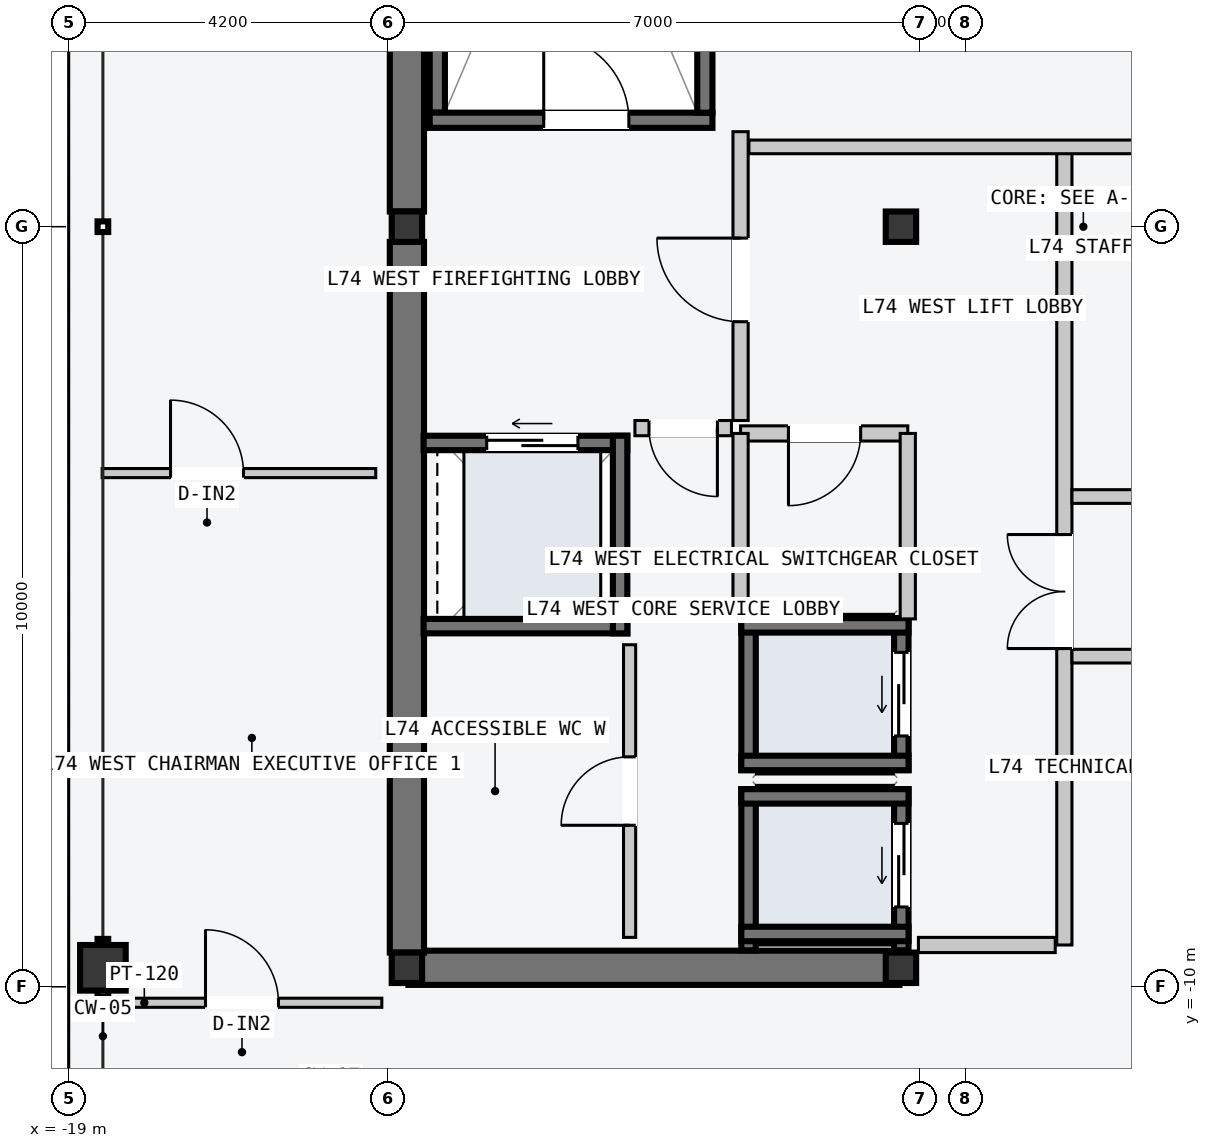
"""IFC4 building model, lengths in metres.
Left out: names, types, materials, properties, quantities, classifications, styles, units other than length and angle.
Written with IfcOpenShell. Run it as: python <this file> out.ifc"""

import sys

from ifc_helpers import new_model, si_unit, direction, frame, frame_2d, origin, origin_2d, place, context, subcontext, project, spatial, rectangle, hollow_rectangle, i_section, extrude, element, fill, save


model = new_model("IFC4")
c1 = context("Model", 3, precision=1e-05, world=origin(), true_north=direction((0.0, 1.0)))
c2 = subcontext(c1, "Body", "Model", "MODEL_VIEW")
j1 = project(units=[si_unit("LENGTHUNIT", "METRE"), si_unit("PLANEANGLEUNIT", "RADIAN")], contexts=[c1])
p1 = place(None, origin())
s1 = spatial("IfcSite", under=j1, at=p1, CompositionType="ELEMENT")
p2 = place(p1, origin())
s2 = spatial("IfcBuilding", under=s1, at=p2, CompositionType="ELEMENT")
p3 = place(p2, frame((0.0, 0.0, 280.8)))
s3 = spatial("IfcBuildingStorey", under=s2, at=p3, CompositionType="ELEMENT", Elevation=280.8)
p4 = place(p3, frame((-14.53, -9.75, -0.2), z_axis=(0.0, 0.0, 1.0), x_axis=(1.0, 0.0, 0.0)))
e1 = element("IfcWall", 1, at=p4, inside=s3, PredefinedType="SHEAR", context=c2, shape_type="SweptSolid", body=[
    extrude(rectangle(XDim=6.46, YDim=0.45, at=frame_2d((3.23, 0.0))), origin(), (0.0, 0.0, 1.0), 3.6),
])
for number, where, z_axis, x_axis in (
    (2, (-14.55, -9.55, -0.2), (0.0, 0.0, 1.0), (0.0, 1.0, 0.0)),
    (3, (-14.55, 0.2, -0.2), (0.0, 0.0, 1.0), (0.0, 1.0, 0.0)),
):
    element("IfcWall", number, at=place(p3, frame(where, z_axis=z_axis, x_axis=x_axis)), inside=s3, PredefinedType="SHEAR", context=c2, shape_type="SweptSolid", body=[
        extrude(rectangle(XDim=9.35, YDim=0.45, at=frame_2d((4.675, 0.0))), origin(), (0.0, 0.0, 1.0), 3.6),
    ])
p5 = place(p3, frame((-14.15, 1.5, -0.2), z_axis=(0.0, 0.0, 1.0), x_axis=(0.0, 1.0, 0.0)))
e4 = element("IfcWall", 4, at=p5, inside=s3, PredefinedType="SOLIDWALL", context=c2, shape_type="SweptSolid", body=[
    extrude(rectangle(XDim=7.8, YDim=0.2, at=frame_2d((3.9, 0.0))), origin(), (0.0, 0.0, 1.0), 3.6),
])
p6 = place(p3, frame((-14.25, 1.4, -0.2), z_axis=(0.0, 0.0, 1.0), x_axis=(1.0, 0.0, 0.0)))
e5 = element("IfcWall", 5, at=p6, inside=s3, PredefinedType="SOLIDWALL", context=c2, shape_type="SweptSolid", body=[
    extrude(rectangle(XDim=3.72, YDim=0.2, at=frame_2d((1.86, 0.0))), origin(), (0.0, 0.0, 1.0), 3.6),
])
p7 = place(p6, frame((1.5, 0.0, 0.2)))
e6 = element("IfcOpeningElement", 6, at=p7, cuts=e5, PredefinedType="OPENING", context=c2, shape_type="SweptSolid", body=[
    extrude(rectangle(XDim=1.12, YDim=2.18, at=frame_2d((0.56, 1.09))), frame((0.0, 0.11, 0.0), z_axis=(0.0, -1.0, 0.0), x_axis=(1.0, 0.0, 0.0)), (0.0, 0.0, 1.0), 0.22),
])
p8 = place(p3, frame((-10.63, 1.5, -0.2), z_axis=(0.0, 0.0, 1.0), x_axis=(0.0, 1.0, 0.0)))
e7 = element("IfcWall", 7, at=p8, inside=s3, PredefinedType="SOLIDWALL", context=c2, shape_type="SweptSolid", body=[
    extrude(rectangle(XDim=7.8, YDim=0.2, at=frame_2d((3.9, 0.0))), origin(), (0.0, 0.0, 1.0), 3.6),
])
for number, where, z_axis, x_axis in (
    (8, (-14.55, -9.75, 0.0), (0.0, 0.0, 1.0), (1.0, 0.0, 0.0)),
    (9, (-14.55, 0.0, 0.0), (0.0, 0.0, 1.0), (1.0, 0.0, 0.0)),
    (10, (-8.05, -9.75, 0.0), (0.0, 0.0, 1.0), (1.0, 0.0, 0.0)),
    (11, (-8.05, 0.0, 0.0), (0.0, 0.0, 1.0), (1.0, 0.0, 0.0)),
):
    element("IfcColumn", number, at=place(p3, frame(where, z_axis=z_axis, x_axis=x_axis)), inside=s3, PredefinedType="COLUMN", context=c2, shape_type="SweptSolid", body=[
        extrude(i_section(OverallWidth=0.4, OverallDepth=0.4, WebThickness=0.013, FlangeThickness=0.021, at=origin_2d()), origin(), (0.0, 0.0, 1.0), 3.6),
    ])
p9 = place(p3, frame((-18.55, -9.75, 0.0), z_axis=(0.0, 0.0, 1.0), x_axis=(0.0, 1.0, 0.0)))
e12 = element("IfcColumn", 12, at=p9, inside=s3, PredefinedType="COLUMN", context=c2, shape_type="SweptSolid", body=[
    extrude(hollow_rectangle(XDim=0.6, YDim=0.6, WallThickness=0.025, at=origin_2d()), origin(), (0.0, 0.0, 1.0), 3.6),
])
p10 = place(p3, frame((-8.045, -9.52, -0.2), z_axis=(0.0, 0.0, 1.0), x_axis=(0.0, 1.0, 0.0)))
e13 = element("IfcWall", 13, at=p10, inside=s3, PredefinedType="SOLIDWALL", context=c2, shape_type="SweptSolid", body=[
    extrude(rectangle(XDim=2.12, YDim=0.19, at=frame_2d((1.06, 0.0))), origin(), (0.0, 0.0, 1.0), 3.6),
])
p11 = place(p10, frame((0.57, 0.0, 0.2)))
e14 = element("IfcOpeningElement", 14, at=p11, cuts=e13, PredefinedType="OPENING", context=c2, shape_type="SweptSolid", body=[
    extrude(rectangle(XDim=1.1, YDim=2.2, at=frame_2d((0.55, 1.1))), frame((0.0, 0.105, 0.0), z_axis=(0.0, -1.0, 0.0), x_axis=(1.0, 0.0, 0.0)), (0.0, 0.0, 1.0), 0.21),
])
p12 = place(p3, frame((-10.055, -9.52, -0.2), z_axis=(0.0, 0.0, 1.0), x_axis=(0.0, 1.0, 0.0)))
e15 = element("IfcWall", 15, at=p12, inside=s3, PredefinedType="SOLIDWALL", context=c2, shape_type="SweptSolid", body=[
    extrude(rectangle(XDim=2.12, YDim=0.19, at=frame_2d((1.06, 0.0))), origin(), (0.0, 0.0, 1.0), 3.6),
])
for number, where, z_axis, x_axis in (
    (16, (-10.15, -7.495, -0.2), (0.0, 0.0, 1.0), (1.0, 0.0, 0.0)),
    (17, (-10.15, -9.305, -0.2), (0.0, 0.0, 1.0), (1.0, 0.0, 0.0)),
):
    element("IfcWall", number, at=place(p3, frame(where, z_axis=z_axis, x_axis=x_axis)), inside=s3, PredefinedType="SOLIDWALL", context=c2, shape_type="SweptSolid", body=[
        extrude(rectangle(XDim=2.2, YDim=0.19, at=frame_2d((1.1, 0.0))), origin(), (0.0, 0.0, 1.0), 3.6),
    ])
p13 = place(p3, frame((-8.045, -7.15, -0.2), z_axis=(0.0, 0.0, 1.0), x_axis=(0.0, 1.0, 0.0)))
e18 = element("IfcWall", 18, at=p13, inside=s3, PredefinedType="SOLIDWALL", context=c2, shape_type="SweptSolid", body=[
    extrude(rectangle(XDim=2.0, YDim=0.19, at=frame_2d((1.0, 0.0))), origin(), (0.0, 0.0, 1.0), 3.6),
])
p14 = place(p13, frame((0.45, 0.0, 0.2)))
e19 = element("IfcOpeningElement", 19, at=p14, cuts=e18, PredefinedType="OPENING", context=c2, shape_type="SweptSolid", body=[
    extrude(rectangle(XDim=1.1, YDim=2.2, at=frame_2d((0.55, 1.1))), frame((0.0, 0.105, 0.0), z_axis=(0.0, -1.0, 0.0), x_axis=(1.0, 0.0, 0.0)), (0.0, 0.0, 1.0), 0.21),
])
p15 = place(p3, frame((-10.055, -7.15, -0.2), z_axis=(0.0, 0.0, 1.0), x_axis=(0.0, 1.0, 0.0)))
e20 = element("IfcWall", 20, at=p15, inside=s3, PredefinedType="SOLIDWALL", context=c2, shape_type="SweptSolid", body=[
    extrude(rectangle(XDim=2.0, YDim=0.19, at=frame_2d((1.0, 0.0))), origin(), (0.0, 0.0, 1.0), 3.6),
])
for number, where, z_axis, x_axis in (
    (21, (-10.15, -5.245, -0.2), (0.0, 0.0, 1.0), (1.0, 0.0, 0.0)),
    (22, (-10.15, -7.055, -0.2), (0.0, 0.0, 1.0), (1.0, 0.0, 0.0)),
):
    element("IfcWall", number, at=place(p3, frame(where, z_axis=z_axis, x_axis=x_axis)), inside=s3, PredefinedType="SOLIDWALL", context=c2, shape_type="SweptSolid", body=[
        extrude(rectangle(XDim=2.2, YDim=0.19, at=frame_2d((1.1, 0.0))), origin(), (0.0, 0.0, 1.0), 3.6),
    ])
p16 = place(p3, frame((-14.33, -2.845, -0.2), z_axis=(0.0, 0.0, 1.0), x_axis=(1.0, 0.0, 0.0)))
e23 = element("IfcWall", 23, at=p16, inside=s3, PredefinedType="SOLIDWALL", context=c2, shape_type="SweptSolid", body=[
    extrude(rectangle(XDim=2.68, YDim=0.19, at=frame_2d((1.34, 0.0))), origin(), (0.0, 0.0, 1.0), 3.6),
])
p17 = place(p16, frame((0.83, 0.0, 0.2)))
e24 = element("IfcOpeningElement", 24, at=p17, cuts=e23, PredefinedType="OPENING", context=c2, shape_type="SweptSolid", body=[
    extrude(rectangle(XDim=1.2, YDim=2.2, at=frame_2d((0.6, 1.1))), frame((0.0, 0.105, 0.0), z_axis=(0.0, -1.0, 0.0), x_axis=(1.0, 0.0, 0.0)), (0.0, 0.0, 1.0), 0.21),
])
p18 = place(p3, frame((-14.33, -5.255, -0.2), z_axis=(0.0, 0.0, 1.0), x_axis=(1.0, 0.0, 0.0)))
e25 = element("IfcWall", 25, at=p18, inside=s3, PredefinedType="SOLIDWALL", context=c2, shape_type="SweptSolid", body=[
    extrude(rectangle(XDim=2.68, YDim=0.19, at=frame_2d((1.34, 0.0))), origin(), (0.0, 0.0, 1.0), 3.6),
])
p19 = place(p3, frame((-11.745, -5.35, -0.2), z_axis=(0.0, 0.0, 1.0), x_axis=(0.0, 1.0, 0.0)))
e26 = element("IfcWall", 26, at=p19, inside=s3, PredefinedType="SOLIDWALL", context=c2, shape_type="SweptSolid", body=[
    extrude(rectangle(XDim=2.6, YDim=0.19, at=frame_2d((1.3, 0.0))), origin(), (0.0, 0.0, 1.0), 3.6),
])
p20 = place(p3, frame((-5.9, -9.45, 0.0), z_axis=(0.0, 0.0, 1.0), x_axis=(0.0, 1.0, 0.0)))
e27 = element("IfcWall", 27, at=p20, inside=s3, PredefinedType="PARTITIONING", context=c2, shape_type="SweptSolid", body=[
    extrude(rectangle(XDim=10.5, YDim=0.2, at=frame_2d((5.25, 0.0))), origin(), (0.0, 0.0, 1.0), 3.4),
])
p21 = place(p20, frame((3.9, 0.0, 0.0)))
e28 = element("IfcOpeningElement", 28, at=p21, cuts=e27, PredefinedType="OPENING", context=c2, shape_type="SweptSolid", body=[
    extrude(rectangle(XDim=1.5, YDim=2.2, at=frame_2d((0.75, 1.1))), frame((0.0, 0.11, 0.0), z_axis=(0.0, -1.0, 0.0), x_axis=(1.0, 0.0, 0.0)), (0.0, 0.0, 1.0), 0.22),
])
p22 = place(p3, frame((-6.02, -9.45, 0.0), z_axis=(0.0, 0.0, 1.0), x_axis=(-1.0, 0.0, 0.0)))
e29 = element("IfcWall", 29, at=p22, inside=s3, PredefinedType="PARTITIONING", context=c2, shape_type="SweptSolid", body=[
    extrude(rectangle(XDim=1.8, YDim=0.2, at=frame_2d((0.9, 0.0))), origin(), (0.0, 0.0, 1.0), 3.4),
])
p23 = place(p3, frame((-10.16, -2.55, 0.0), z_axis=(0.0, 0.0, 1.0), x_axis=(0.0, 1.0, 0.0)))
e30 = element("IfcWall", 30, at=p23, inside=s3, PredefinedType="PARTITIONING", context=c2, shape_type="SweptSolid", body=[
    extrude(rectangle(XDim=3.8, YDim=0.2, at=frame_2d((1.9, 0.0))), origin(), (0.0, 0.0, 1.0), 3.4),
])
p24 = place(p23, frame((1.3, 0.0, 0.0)))
e31 = element("IfcOpeningElement", 31, at=p24, cuts=e30, PredefinedType="OPENING", context=c2, shape_type="SweptSolid", body=[
    extrude(rectangle(XDim=1.1, YDim=2.15, at=frame_2d((0.55, 1.075))), frame((0.0, 0.11, 0.0), z_axis=(0.0, -1.0, 0.0), x_axis=(1.0, 0.0, 0.0)), (0.0, 0.0, 1.0), 0.22),
])
p25 = place(p3, frame((-10.28, -2.65, 0.0), z_axis=(0.0, 0.0, 1.0), x_axis=(-1.0, 0.0, 0.0)))
e32 = element("IfcWall", 32, at=p25, inside=s3, PredefinedType="PARTITIONING", context=c2, shape_type="SweptSolid", body=[
    extrude(rectangle(XDim=1.27, YDim=0.2, at=frame_2d((0.635, 0.0))), origin(), (0.0, 0.0, 1.0), 3.4),
])
p26 = place(p25, frame((0.185, 0.0, 0.0)))
e33 = element("IfcOpeningElement", 33, at=p26, cuts=e32, PredefinedType="OPENING", context=c2, shape_type="SweptSolid", body=[
    extrude(rectangle(XDim=0.9, YDim=2.15, at=frame_2d((0.45, 1.075))), frame((0.0, 0.11, 0.0), z_axis=(0.0, -1.0, 0.0), x_axis=(1.0, 0.0, 0.0)), (0.0, 0.0, 1.0), 0.22),
])
p27 = place(p3, frame((-7.96, -2.72, 0.0), z_axis=(0.0, 0.0, 1.0), x_axis=(-1.0, 0.0, 0.0)))
e34 = element("IfcWall", 34, at=p27, inside=s3, PredefinedType="PARTITIONING", context=c2, shape_type="SweptSolid", body=[
    extrude(rectangle(XDim=2.2, YDim=0.2, at=frame_2d((1.1, 0.0))), origin(), (0.0, 0.0, 1.0), 3.4),
])
p28 = place(p27, frame((0.62, 0.0, 0.0)))
e35 = element("IfcOpeningElement", 35, at=p28, cuts=e34, PredefinedType="OPENING", context=c2, shape_type="SweptSolid", body=[
    extrude(rectangle(XDim=0.95, YDim=2.1, at=frame_2d((0.475, 1.05))), frame((0.0, 0.11, 0.0), z_axis=(0.0, -1.0, 0.0), x_axis=(1.0, 0.0, 0.0)), (0.0, 0.0, 1.0), 0.22),
])
for number, where, z_axis, x_axis in (
    (36, (-7.96, -5.16, 0.0), (0.0, 0.0, 1.0), (0.0, 1.0, 0.0)),
    (37, (-10.16, -5.16, 0.0), (0.0, 0.0, 1.0), (0.0, 1.0, 0.0)),
):
    element("IfcWall", number, at=place(p3, frame(where, z_axis=z_axis, x_axis=x_axis)), inside=s3, PredefinedType="PARTITIONING", context=c2, shape_type="SweptSolid", body=[
        extrude(rectangle(XDim=2.44, YDim=0.2, at=frame_2d((1.22, 0.0))), origin(), (0.0, 0.0, 1.0), 3.4),
    ])
p29 = place(p3, frame((-11.62, -9.35, 0.0), z_axis=(0.0, 0.0, 1.0), x_axis=(0.0, 1.0, 0.0)))
e38 = element("IfcWall", 38, at=p29, inside=s3, PredefinedType="PARTITIONING", context=c2, shape_type="SweptSolid", body=[
    extrude(rectangle(XDim=3.85, YDim=0.16, at=frame_2d((1.925, 0.0))), origin(), (0.0, 0.0, 1.0), 3.4),
])
p30 = place(p29, frame((1.475, 0.0, 0.0)))
e39 = element("IfcOpeningElement", 39, at=p30, cuts=e38, PredefinedType="OPENING", context=c2, shape_type="SweptSolid", body=[
    extrude(rectangle(XDim=0.9, YDim=2.15, at=frame_2d((0.45, 1.075))), frame((0.0, 0.09, 0.0), z_axis=(0.0, -1.0, 0.0), x_axis=(1.0, 0.0, 0.0)), (0.0, 0.0, 1.0), 0.18),
])
p31 = place(p3, frame((-10.05, 1.05, 0.0), z_axis=(0.0, 0.0, 1.0), x_axis=(1.0, 0.0, 0.0)))
e40 = element("IfcWall", 40, at=p31, inside=s3, PredefinedType="PARTITIONING", context=c2, shape_type="SweptSolid", body=[
    extrude(rectangle(XDim=7.04, YDim=0.18, at=frame_2d((3.52, 0.0))), origin(), (0.0, 0.0, 1.0), 3.4),
])
for number, where, z_axis, x_axis in (
    (41, (-5.8, -3.55, 0.0), (0.0, 0.0, 1.0), (1.0, 0.0, 0.0)),
    (42, (-5.8, -5.65, 0.0), (0.0, 0.0, 1.0), (1.0, 0.0, 0.0)),
):
    element("IfcWall", number, at=place(p3, frame(where, z_axis=z_axis, x_axis=x_axis)), inside=s3, PredefinedType="PARTITIONING", context=c2, shape_type="SweptSolid", body=[
        extrude(rectangle(XDim=2.79, YDim=0.18, at=frame_2d((1.395, 0.0))), origin(), (0.0, 0.0, 1.0), 3.4),
    ])
p32 = place(p3, frame((-18.56, -10.21, 0.0), z_axis=(0.0, 0.0, 1.0), x_axis=(1.0, 0.0, 0.0)))
e43 = element("IfcWall", 43, at=p32, inside=s3, PredefinedType="PARTITIONING", context=c2, shape_type="SweptSolid", body=[
    extrude(rectangle(XDim=3.68, YDim=0.12, at=frame_2d((1.84, 0.0))), origin(), (0.0, 0.0, 1.0), 3.4),
])
p33 = place(p32, frame((1.36, 0.0, 0.0)))
e44 = element("IfcOpeningElement", 44, at=p33, cuts=e43, PredefinedType="OPENING", context=c2, shape_type="SweptSolid", body=[
    extrude(rectangle(XDim=0.96, YDim=2.18, at=frame_2d((0.48, 1.09))), frame((0.0, 0.07, 0.0), z_axis=(0.0, -1.0, 0.0), x_axis=(1.0, 0.0, 0.0)), (0.0, 0.0, 1.0), 0.14),
])
p34 = place(p3, frame((-18.56, -3.242, 0.0), z_axis=(0.0, 0.0, 1.0), x_axis=(1.0, 0.0, 0.0)))
e45 = element("IfcWall", 45, at=p34, inside=s3, PredefinedType="PARTITIONING", context=c2, shape_type="SweptSolid", body=[
    extrude(rectangle(XDim=3.6, YDim=0.12, at=frame_2d((1.8, 0.0))), origin(), (0.0, 0.0, 1.0), 3.05),
])
p35 = place(p34, frame((0.9, 0.0, 0.0)))
e46 = element("IfcOpeningElement", 46, at=p35, cuts=e45, PredefinedType="OPENING", context=c2, shape_type="SweptSolid", body=[
    extrude(rectangle(XDim=0.96, YDim=2.18, at=frame_2d((0.48, 1.09))), frame((0.0, 0.07, 0.0), z_axis=(0.0, -1.0, 0.0), x_axis=(1.0, 0.0, 0.0)), (0.0, 0.0, 1.0), 0.14),
])
p36 = place(p7, origin())
e47 = element("IfcDoor", 47, at=p36, inside=s3, OperationType="SINGLE_SWING_LEFT", PredefinedType="DOOR", context=c2, shape_type="SweptSolid", body=[
    extrude(rectangle(XDim=1.12, YDim=2.18, at=frame_2d((0.56, 1.09))), frame((0.0, 0.025, 0.0), z_axis=(0.0, -1.0, 0.0), x_axis=(1.0, 0.0, 0.0)), (0.0, 0.0, 1.0), 0.05),
])
fill(e6, e47)
p37 = place(p11, origin())
e48 = element("IfcDoor", 48, at=p37, inside=s3, OperationType="SLIDING_TO_LEFT", PredefinedType="DOOR", context=c2, shape_type="SweptSolid", body=[
    extrude(rectangle(XDim=1.1, YDim=2.2, at=frame_2d((0.55, 1.1))), frame((0.0, 0.025, 0.0), z_axis=(0.0, -1.0, 0.0), x_axis=(1.0, 0.0, 0.0)), (0.0, 0.0, 1.0), 0.05),
])
fill(e14, e48)
p38 = place(p14, origin())
e49 = element("IfcDoor", 49, at=p38, inside=s3, OperationType="SLIDING_TO_LEFT", PredefinedType="DOOR", context=c2, shape_type="SweptSolid", body=[
    extrude(rectangle(XDim=1.1, YDim=2.2, at=frame_2d((0.55, 1.1))), frame((0.0, 0.025, 0.0), z_axis=(0.0, -1.0, 0.0), x_axis=(1.0, 0.0, 0.0)), (0.0, 0.0, 1.0), 0.05),
])
fill(e19, e49)
p39 = place(p17, origin())
e50 = element("IfcDoor", 50, at=p39, inside=s3, OperationType="SLIDING_TO_LEFT", PredefinedType="DOOR", context=c2, shape_type="SweptSolid", body=[
    extrude(rectangle(XDim=1.2, YDim=2.2, at=frame_2d((0.6, 1.1))), frame((0.0, 0.025, 0.0), z_axis=(0.0, -1.0, 0.0), x_axis=(1.0, 0.0, 0.0)), (0.0, 0.0, 1.0), 0.05),
])
fill(e24, e50)
p40 = place(p21, origin())
e51 = element("IfcDoor", 51, at=p40, inside=s3, OperationType="DOUBLE_DOOR_SINGLE_SWING", PredefinedType="DOOR", context=c2, shape_type="SweptSolid", body=[
    extrude(rectangle(XDim=1.5, YDim=2.2, at=frame_2d((0.75, 1.1))), frame((0.0, 0.025, 0.0), z_axis=(0.0, -1.0, 0.0), x_axis=(1.0, 0.0, 0.0)), (0.0, 0.0, 1.0), 0.05),
])
fill(e28, e51)
p41 = place(p24, origin())
e52 = element("IfcDoor", 52, at=p41, inside=s3, OperationType="SINGLE_SWING_RIGHT", PredefinedType="DOOR", context=c2, shape_type="SweptSolid", body=[
    extrude(rectangle(XDim=1.1, YDim=2.15, at=frame_2d((0.55, 1.075))), frame((0.0, 0.025, 0.0), z_axis=(0.0, -1.0, 0.0), x_axis=(1.0, 0.0, 0.0)), (0.0, 0.0, 1.0), 0.05),
])
fill(e31, e52)
p42 = place(p26, origin())
e53 = element("IfcDoor", 53, at=p42, inside=s3, OperationType="SINGLE_SWING_LEFT", PredefinedType="DOOR", context=c2, shape_type="SweptSolid", body=[
    extrude(rectangle(XDim=0.9, YDim=2.15, at=frame_2d((0.45, 1.075))), frame((0.0, 0.025, 0.0), z_axis=(0.0, -1.0, 0.0), x_axis=(1.0, 0.0, 0.0)), (0.0, 0.0, 1.0), 0.05),
])
fill(e33, e53)
p43 = place(p28, origin())
e54 = element("IfcDoor", 54, at=p43, inside=s3, OperationType="SINGLE_SWING_RIGHT", PredefinedType="DOOR", context=c2, shape_type="SweptSolid", body=[
    extrude(rectangle(XDim=0.95, YDim=2.1, at=frame_2d((0.475, 1.05))), frame((0.0, 0.025, 0.0), z_axis=(0.0, -1.0, 0.0), x_axis=(1.0, 0.0, 0.0)), (0.0, 0.0, 1.0), 0.05),
])
fill(e35, e54)
p44 = place(p30, origin())
e55 = element("IfcDoor", 55, at=p44, inside=s3, OperationType="SINGLE_SWING_LEFT", PredefinedType="DOOR", context=c2, shape_type="SweptSolid", body=[
    extrude(rectangle(XDim=0.9, YDim=2.15, at=frame_2d((0.45, 1.075))), frame((0.0, 0.025, 0.0), z_axis=(0.0, -1.0, 0.0), x_axis=(1.0, 0.0, 0.0)), (0.0, 0.0, 1.0), 0.05),
])
fill(e39, e55)
p45 = place(p33, origin())
e56 = element("IfcDoor", 56, at=p45, inside=s3, OperationType="SINGLE_SWING_LEFT", PredefinedType="DOOR", context=c2, shape_type="SweptSolid", body=[
    extrude(rectangle(XDim=0.96, YDim=2.18, at=frame_2d((0.48, 1.09))), frame((0.0, 0.025, 0.0), z_axis=(0.0, -1.0, 0.0), x_axis=(1.0, 0.0, 0.0)), (0.0, 0.0, 1.0), 0.05),
])
fill(e44, e56)
p46 = place(p35, origin())
e57 = element("IfcDoor", 57, at=p46, inside=s3, OperationType="SINGLE_SWING_LEFT", PredefinedType="DOOR", context=c2, shape_type="SweptSolid", body=[
    extrude(rectangle(XDim=0.96, YDim=2.18, at=frame_2d((0.48, 1.09))), frame((0.0, 0.025, 0.0), z_axis=(0.0, -1.0, 0.0), x_axis=(1.0, 0.0, 0.0)), (0.0, 0.0, 1.0), 0.05),
])
fill(e46, e57)
save(model, sys.argv[1])
